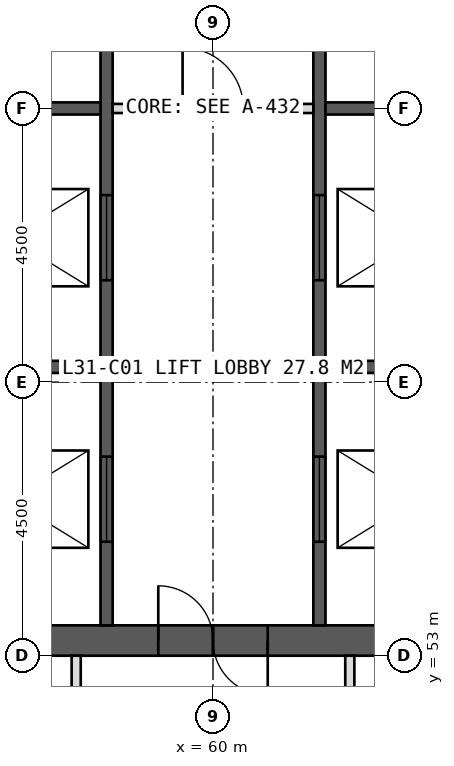
"""IFC4 building model, lengths in metres.
Left out: names, types, materials, properties, quantities, classifications, styles, units other than length and angle.
Written with IfcOpenShell. Run it as: python <this file> out.ifc"""

import sys

from ifc_helpers import new_model, si_unit, direction, frame, frame_2d, origin, place, context, subcontext, project, spatial, rectangle, extrude, element, fill, save


model = new_model("IFC4")
c1 = context("Model", 3, precision=1e-05, world=origin(), true_north=direction((0.0, 1.0)))
c2 = subcontext(c1, "Body", "Model", "MODEL_VIEW")
j1 = project(units=[si_unit("LENGTHUNIT", "METRE"), si_unit("PLANEANGLEUNIT", "RADIAN")], contexts=[c1])
p1 = place(None, origin())
s1 = spatial("IfcSite", under=j1, at=p1, CompositionType="ELEMENT")
p2 = place(p1, origin())
s2 = spatial("IfcBuilding", under=s1, at=p2, CompositionType="ELEMENT")
p3 = place(p2, frame((0.0, 0.0, 132.0)))
s3 = spatial("IfcBuildingStorey", under=s2, at=p3, CompositionType="ELEMENT", Elevation=132.0)
p4 = place(p3, frame((51.0, 53.25, 0.0), z_axis=(0.0, 0.0, 1.0), x_axis=(1.0, 0.0, 0.0)))
e1 = element("IfcWall", 1, at=p4, inside=s3, PredefinedType="SHEAR", context=c2, shape_type="SweptSolid", body=[
    extrude(rectangle(XDim=18.0, YDim=0.5, at=frame_2d((9.0, 0.0))), origin(), (0.0, 0.0, 1.0), 4.0),
])
p5 = place(p4, frame((8.1, 0.0, 0.0)))
e2 = element("IfcOpeningElement", 2, at=p5, cuts=e1, PredefinedType="OPENING", context=c2, shape_type="SweptSolid", body=[
    extrude(rectangle(XDim=1.8, YDim=2.2, at=frame_2d((0.9, 1.1))), frame((0.0, 0.26, 0.0), z_axis=(0.0, -1.0, 0.0), x_axis=(1.0, 0.0, 0.0)), (0.0, 0.0, 1.0), 0.52),
])
p6 = place(p3, frame((58.25, 53.5, 0.0), z_axis=(0.0, 0.0, 1.0), x_axis=(0.0, 1.0, 0.0)))
e3 = element("IfcWall", 3, at=p6, inside=s3, PredefinedType="SHEAR", context=c2, shape_type="SweptSolid", body=[
    extrude(rectangle(XDim=17.0, YDim=0.2, at=frame_2d((8.5, 0.0))), origin(), (0.0, 0.0, 1.0), 4.0),
])
p7 = place(p6, frame((1.375, 0.0, 0.0)))
e4 = element("IfcOpeningElement", 4, at=p7, cuts=e3, PredefinedType="OPENING", context=c2, shape_type="SweptSolid", body=[
    extrude(rectangle(XDim=1.4, YDim=2.2, at=frame_2d((0.7, 1.1))), frame((0.0, 0.11, 0.0), z_axis=(0.0, -1.0, 0.0), x_axis=(1.0, 0.0, 0.0)), (0.0, 0.0, 1.0), 0.22),
])
p8 = place(p6, frame((5.675, 0.0, 0.0)))
e5 = element("IfcOpeningElement", 5, at=p8, cuts=e3, PredefinedType="OPENING", context=c2, shape_type="SweptSolid", body=[
    extrude(rectangle(XDim=1.4, YDim=2.2, at=frame_2d((0.7, 1.1))), frame((0.0, 0.11, 0.0), z_axis=(0.0, -1.0, 0.0), x_axis=(1.0, 0.0, 0.0)), (0.0, 0.0, 1.0), 0.22),
])
p9 = place(p3, frame((61.75, 53.5, 0.0), z_axis=(0.0, 0.0, 1.0), x_axis=(0.0, 1.0, 0.0)))
e6 = element("IfcWall", 6, at=p9, inside=s3, PredefinedType="SHEAR", context=c2, shape_type="SweptSolid", body=[
    extrude(rectangle(XDim=17.0, YDim=0.2, at=frame_2d((8.5, 0.0))), origin(), (0.0, 0.0, 1.0), 4.0),
])
p10 = place(p9, frame((1.375, 0.0, 0.0)))
e7 = element("IfcOpeningElement", 7, at=p10, cuts=e6, PredefinedType="OPENING", context=c2, shape_type="SweptSolid", body=[
    extrude(rectangle(XDim=1.4, YDim=2.2, at=frame_2d((0.7, 1.1))), frame((0.0, 0.11, 0.0), z_axis=(0.0, -1.0, 0.0), x_axis=(1.0, 0.0, 0.0)), (0.0, 0.0, 1.0), 0.22),
])
p11 = place(p9, frame((5.675, 0.0, 0.0)))
e8 = element("IfcOpeningElement", 8, at=p11, cuts=e6, PredefinedType="OPENING", context=c2, shape_type="SweptSolid", body=[
    extrude(rectangle(XDim=1.4, YDim=2.2, at=frame_2d((0.7, 1.1))), frame((0.0, 0.11, 0.0), z_axis=(0.0, -1.0, 0.0), x_axis=(1.0, 0.0, 0.0)), (0.0, 0.0, 1.0), 0.22),
])
for number, where, z_axis, x_axis in (
    (9, (55.1, 57.75, 0.0), (0.0, 0.0, 1.0), (1.0, 0.0, 0.0)),
    (10, (61.85, 57.75, 0.0), (0.0, 0.0, 1.0), (1.0, 0.0, 0.0)),
    (11, (55.1, 62.0, 0.0), (0.0, 0.0, 1.0), (1.0, 0.0, 0.0)),
    (12, (61.85, 62.0, 0.0), (0.0, 0.0, 1.0), (1.0, 0.0, 0.0)),
):
    element("IfcWall", number, at=place(p3, frame(where, z_axis=z_axis, x_axis=x_axis)), inside=s3, PredefinedType="SHEAR", context=c2, shape_type="SweptSolid", body=[
        extrude(rectangle(XDim=3.05, YDim=0.2, at=frame_2d((1.525, 0.0))), origin(), (0.0, 0.0, 1.0), 4.0),
    ])
for number, where, z_axis, x_axis in (
    (13, (62.25, 53.0, 0.0), (0.0, 0.0, 1.0), (0.0, -1.0, 0.0)),
    (14, (57.75, 53.0, 0.0), (0.0, 0.0, 1.0), (0.0, -1.0, 0.0)),
):
    element("IfcWall", number, at=place(p3, frame(where, z_axis=z_axis, x_axis=x_axis)), inside=s3, PredefinedType="PARTITIONING", context=c2, shape_type="SweptSolid", body=[
        extrude(rectangle(XDim=5.1, YDim=0.15, at=frame_2d((2.55, 0.0))), origin(), (0.0, 0.0, 1.0), 3.75),
    ])
p12 = place(p3, frame((58.35, 62.0, 0.0), z_axis=(0.0, 0.0, 1.0), x_axis=(1.0, 0.0, 0.0)))
e15 = element("IfcWall", 15, at=p12, inside=s3, PredefinedType="PARTITIONING", context=c2, shape_type="SweptSolid", body=[
    extrude(rectangle(XDim=3.3, YDim=0.15, at=frame_2d((1.65, 0.0))), origin(), (0.0, 0.0, 1.0), 3.75),
])
p13 = place(p12, frame((1.15, 0.0, 0.0)))
e16 = element("IfcOpeningElement", 16, at=p13, cuts=e15, PredefinedType="OPENING", context=c2, shape_type="SweptSolid", body=[
    extrude(rectangle(XDim=1.0, YDim=2.1, at=frame_2d((0.5, 1.05))), frame((0.0, 0.085, 0.0), z_axis=(0.0, -1.0, 0.0), x_axis=(1.0, 0.0, 0.0)), (0.0, 0.0, 1.0), 0.17),
])
p14 = place(p5, origin())
e17 = element("IfcDoor", 17, at=p14, inside=s3, OperationType="DOUBLE_DOOR_SINGLE_SWING", PredefinedType="DOOR", context=c2, shape_type="SweptSolid", body=[
    extrude(rectangle(XDim=1.8, YDim=2.2, at=frame_2d((0.9, 1.1))), frame((0.0, 0.025, 0.0), z_axis=(0.0, -1.0, 0.0), x_axis=(1.0, 0.0, 0.0)), (0.0, 0.0, 1.0), 0.05),
])
fill(e2, e17)
p15 = place(p7, origin())
e18 = element("IfcDoor", 18, at=p15, inside=s3, OperationType="SLIDING_TO_LEFT", PredefinedType="DOOR", context=c2, shape_type="SweptSolid", body=[
    extrude(rectangle(XDim=1.4, YDim=2.2, at=frame_2d((0.7, 1.1))), frame((0.0, 0.025, 0.0), z_axis=(0.0, -1.0, 0.0), x_axis=(1.0, 0.0, 0.0)), (0.0, 0.0, 1.0), 0.05),
])
fill(e4, e18)
p16 = place(p10, origin())
e19 = element("IfcDoor", 19, at=p16, inside=s3, OperationType="SLIDING_TO_LEFT", PredefinedType="DOOR", context=c2, shape_type="SweptSolid", body=[
    extrude(rectangle(XDim=1.4, YDim=2.2, at=frame_2d((0.7, 1.1))), frame((0.0, 0.025, 0.0), z_axis=(0.0, -1.0, 0.0), x_axis=(1.0, 0.0, 0.0)), (0.0, 0.0, 1.0), 0.05),
])
fill(e7, e19)
p17 = place(p8, origin())
e20 = element("IfcDoor", 20, at=p17, inside=s3, OperationType="SLIDING_TO_LEFT", PredefinedType="DOOR", context=c2, shape_type="SweptSolid", body=[
    extrude(rectangle(XDim=1.4, YDim=2.2, at=frame_2d((0.7, 1.1))), frame((0.0, 0.025, 0.0), z_axis=(0.0, -1.0, 0.0), x_axis=(1.0, 0.0, 0.0)), (0.0, 0.0, 1.0), 0.05),
])
fill(e5, e20)
p18 = place(p11, origin())
e21 = element("IfcDoor", 21, at=p18, inside=s3, OperationType="SLIDING_TO_LEFT", PredefinedType="DOOR", context=c2, shape_type="SweptSolid", body=[
    extrude(rectangle(XDim=1.4, YDim=2.2, at=frame_2d((0.7, 1.1))), frame((0.0, 0.025, 0.0), z_axis=(0.0, -1.0, 0.0), x_axis=(1.0, 0.0, 0.0)), (0.0, 0.0, 1.0), 0.05),
])
fill(e8, e21)
p19 = place(p13, origin())
e22 = element("IfcDoor", 22, at=p19, inside=s3, OperationType="SINGLE_SWING_LEFT", PredefinedType="DOOR", context=c2, shape_type="SweptSolid", body=[
    extrude(rectangle(XDim=1.0, YDim=2.1, at=frame_2d((0.5, 1.05))), frame((0.0, 0.025, 0.0), z_axis=(0.0, -1.0, 0.0), x_axis=(1.0, 0.0, 0.0)), (0.0, 0.0, 1.0), 0.05),
])
fill(e16, e22)
save(model, sys.argv[1])
